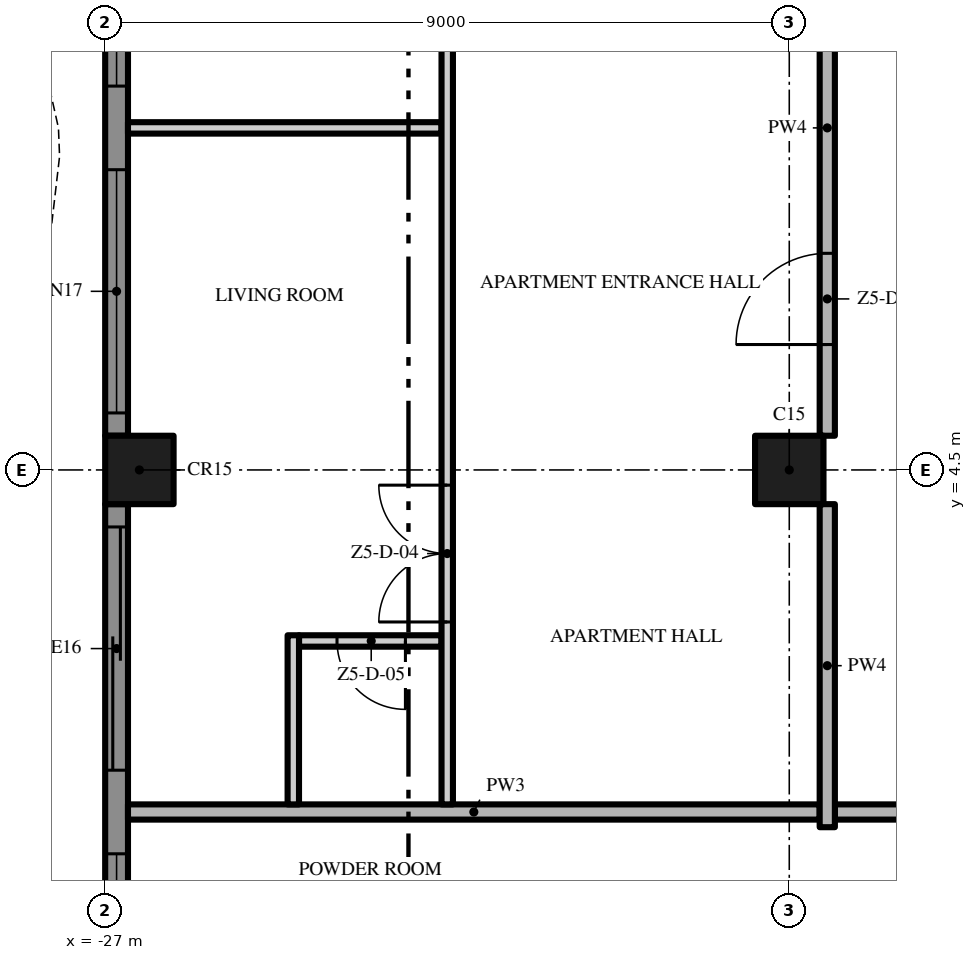
"""IFC4 building model, lengths in metres.
Left out: names, types, materials, properties, quantities, classifications, styles, units other than length and angle.
Written with IfcOpenShell. Run it as: python <this file> out.ifc"""

import sys

from ifc_helpers import new_model, si_unit, direction, frame, frame_2d, origin, origin_2d, place, context, subcontext, project, spatial, polyline, rectangle, outline, extrude, element, fill, save


model = new_model("IFC4")
c1 = context("Model", 3, precision=1e-05, world=origin(), true_north=direction((0.0, 1.0)))
c2 = subcontext(c1, "Body", "Model", "MODEL_VIEW")
j1 = project(units=[si_unit("LENGTHUNIT", "METRE"), si_unit("PLANEANGLEUNIT", "RADIAN")], contexts=[c1])
p1 = place(None, origin())
s1 = spatial("IfcSite", under=j1, at=p1, CompositionType="ELEMENT")
p2 = place(p1, origin())
s2 = spatial("IfcBuilding", under=s1, at=p2, CompositionType="ELEMENT")
p3 = place(p2, frame((0.0, 0.0, 276.8)))
s3 = spatial("IfcBuildingStorey", under=s2, at=p3, CompositionType="ELEMENT", Elevation=276.8)
for number, where, z_axis, x_axis in (
    (1, (-18.0, 4.5, 0.0), (0.0, 0.0, 1.0), (1.0, 0.0, 0.0)),
    (2, (-26.55, 4.5, 0.0), (0.0, 0.0, 1.0), (1.0, 0.0, 0.0)),
):
    element("IfcColumn", number, at=place(p3, frame(where, z_axis=z_axis, x_axis=x_axis)), inside=s3, PredefinedType="COLUMN", context=c2, shape_type="SweptSolid", body=[
        extrude(rectangle(XDim=0.9, YDim=0.9, at=origin_2d()), origin(), (0.0, 0.0, 1.0), 3.5),
    ])
p4 = place(p3, frame((-26.85, 4.95, 0.0), z_axis=(0.0, 0.0, 1.0), x_axis=(0.0, 1.0, 0.0)))
e3 = element("IfcWall", 3, at=p4, inside=s3, PredefinedType="SOLIDWALL", context=c2, shape_type="SweptSolid", body=[
    extrude(rectangle(XDim=8.1, YDim=0.3, at=frame_2d((4.05, 0.0))), origin(), (0.0, 0.0, 1.0), 3.5),
])
p5 = place(p4, frame((4.6, 0.0, 0.45)))
e4 = element("IfcOpeningElement", 4, at=p5, cuts=e3, PredefinedType="OPENING", context=c2, shape_type="SweptSolid", body=[
    extrude(rectangle(XDim=3.2, YDim=2.65, at=frame_2d((1.6, 1.325))), frame((0.0, 0.16, 0.0), z_axis=(0.0, -1.0, 0.0), x_axis=(1.0, 0.0, 0.0)), (0.0, 0.0, 1.0), 0.32),
])
p6 = place(p4, frame((0.3, 0.0, 0.45)))
e5 = element("IfcOpeningElement", 5, at=p6, cuts=e3, PredefinedType="OPENING", context=c2, shape_type="SweptSolid", body=[
    extrude(rectangle(XDim=3.2, YDim=2.65, at=frame_2d((1.6, 1.325))), frame((0.0, 0.16, 0.0), z_axis=(0.0, -1.0, 0.0), x_axis=(1.0, 0.0, 0.0)), (0.0, 0.0, 1.0), 0.32),
])
p7 = place(p3, frame((-26.85, -4.05, 0.0), z_axis=(0.0, 0.0, 1.0), x_axis=(0.0, 1.0, 0.0)))
e6 = element("IfcWall", 6, at=p7, inside=s3, PredefinedType="SOLIDWALL", context=c2, shape_type="SweptSolid", body=[
    extrude(rectangle(XDim=8.1, YDim=0.3, at=frame_2d((4.05, 0.0))), origin(), (0.0, 0.0, 1.0), 3.5),
])
p8 = place(p7, frame((4.6, 0.0, 0.0)))
e7 = element("IfcOpeningElement", 7, at=p8, cuts=e6, PredefinedType="OPENING", context=c2, shape_type="SweptSolid", body=[
    extrude(rectangle(XDim=3.2, YDim=2.4, at=frame_2d((1.6, 1.2))), frame((0.0, 0.16, 0.0), z_axis=(0.0, -1.0, 0.0), x_axis=(1.0, 0.0, 0.0)), (0.0, 0.0, 1.0), 0.32),
])
p9 = place(p7, frame((0.3, 0.0, 0.45)))
e8 = element("IfcOpeningElement", 8, at=p9, cuts=e6, PredefinedType="OPENING", context=c2, shape_type="SweptSolid", body=[
    extrude(rectangle(XDim=3.2, YDim=2.65, at=frame_2d((1.6, 1.325))), frame((0.0, 0.16, 0.0), z_axis=(0.0, -1.0, 0.0), x_axis=(1.0, 0.0, 0.0)), (0.0, 0.0, 1.0), 0.32),
])
p10 = place(p3, origin())
e9 = element("IfcWall", 9, at=p10, inside=s3, PredefinedType="USERDEFINED", context=c2, shape_type="SweptSolid", body=[
    extrude(outline(polyline([(-29.649, 18.0), (-29.985, 16.5), (-30.0, 16.125), (-29.869, 15.0), (-29.345, 13.5), (-28.612, 12.0), (-27.951, 10.5), (-27.615, 9.0), (-27.6, 8.625), (-27.731, 7.5), (-28.255, 6.0), (-28.988, 4.5), (-29.649, 3.0), (-29.985, 1.5), (-30.0, 1.125), (-29.869, 0.0), (-29.345, -1.5), (-28.612, -3.0), (-27.951, -4.5), (-27.615, -6.0), (-27.6, -6.375), (-27.731, -7.5), (-28.255, -9.0), (-28.988, -10.5), (-29.649, -12.0), (-29.985, -13.5), (-30.0, -13.875), (-29.869, -15.0), (-29.345, -16.5), (-28.612, -18.0), (-28.388, -17.89), (-29.114, -16.404), (-29.624, -14.944), (-29.749, -13.865), (-29.736, -13.533), (-29.41, -12.079), (-28.761, -10.605), (-28.024, -9.096), (-27.486, -7.556), (-27.349, -6.385), (-27.366, -5.967), (-27.713, -4.421), (-28.385, -2.895), (-29.114, -1.404), (-29.624, 0.056), (-29.749, 1.135), (-29.736, 1.467), (-29.41, 2.921), (-28.761, 4.395), (-28.024, 5.904), (-27.486, 7.444), (-27.349, 8.615), (-27.366, 9.033), (-27.713, 10.579), (-28.385, 12.105), (-29.114, 13.596), (-29.624, 15.056), (-29.749, 16.135), (-29.736, 16.467), (-29.405, 17.945), (-29.649, 18.0)])), origin(), (0.0, 0.0, 1.0), 0.9),
])
p11 = place(p3, frame((17.4, 0.0, 0.0), z_axis=(0.0, 0.0, 1.0), x_axis=(-1.0, 0.0, 0.0)))
e10 = element("IfcWall", 10, at=p11, inside=s3, PredefinedType="PARTITIONING", context=c2, shape_type="SweptSolid", body=[
    extrude(rectangle(XDim=34.8, YDim=0.2, at=frame_2d((17.4, 0.0))), origin(), (0.0, 0.0, 1.0), 3.5),
])
p12 = place(p11, frame((25.65, 0.0, 0.0)))
e11 = element("IfcOpeningElement", 11, at=p12, cuts=e10, PredefinedType="OPENING", context=c2, shape_type="SweptSolid", body=[
    extrude(rectangle(XDim=1.5, YDim=2.4, at=frame_2d((0.75, 1.2))), frame((0.0, 0.11, 0.0), z_axis=(0.0, -1.0, 0.0), x_axis=(1.0, 0.0, 0.0)), (0.0, 0.0, 1.0), 0.22),
])
p13 = place(p11, frame((7.65, 0.0, 0.0)))
e12 = element("IfcOpeningElement", 12, at=p13, cuts=e10, PredefinedType="OPENING", context=c2, shape_type="SweptSolid", body=[
    extrude(rectangle(XDim=1.5, YDim=2.4, at=frame_2d((0.75, 1.2))), frame((0.0, 0.11, 0.0), z_axis=(0.0, -1.0, 0.0), x_axis=(1.0, 0.0, 0.0)), (0.0, 0.0, 1.0), 0.22),
])
p14 = place(p3, frame((-26.7, 0.0, 0.0), z_axis=(0.0, 0.0, 1.0), x_axis=(1.0, 0.0, 0.0)))
e13 = element("IfcWall", 13, at=p14, inside=s3, PredefinedType="PARTITIONING", context=c2, shape_type="SweptSolid", body=[
    extrude(rectangle(XDim=9.1, YDim=0.2, at=frame_2d((4.55, 0.0))), origin(), (0.0, 0.0, 1.0), 3.5),
])
p15 = place(p3, frame((-22.575, 2.25, 0.0), z_axis=(0.0, 0.0, 1.0), x_axis=(-1.0, 0.0, 0.0)))
e14 = element("IfcWall", 14, at=p15, inside=s3, PredefinedType="PARTITIONING", context=c2, shape_type="SweptSolid", body=[
    extrude(rectangle(XDim=1.875, YDim=0.15, at=frame_2d((0.938, 0.0))), origin(), (0.0, 0.0, 1.0), 3.5),
])
p16 = place(p15, frame((0.475, 0.0, 0.0)))
e15 = element("IfcOpeningElement", 15, at=p16, cuts=e14, PredefinedType="OPENING", context=c2, shape_type="SweptSolid", body=[
    extrude(rectangle(XDim=0.9, YDim=2.1, at=frame_2d((0.45, 1.05))), frame((0.0, 0.085, 0.0), z_axis=(0.0, -1.0, 0.0), x_axis=(1.0, 0.0, 0.0)), (0.0, 0.0, 1.0), 0.17),
])
p17 = place(p3, frame((-26.7, 9.0, 0.0), z_axis=(0.0, 0.0, 1.0), x_axis=(1.0, 0.0, 0.0)))
e16 = element("IfcWall", 16, at=p17, inside=s3, PredefinedType="PARTITIONING", context=c2, shape_type="SweptSolid", body=[
    extrude(rectangle(XDim=4.125, YDim=0.15, at=frame_2d((2.062, 0.0))), origin(), (0.0, 0.0, 1.0), 3.5),
])
p18 = place(p3, frame((-24.525, 0.1, 0.0), z_axis=(0.0, 0.0, 1.0), x_axis=(0.0, 1.0, 0.0)))
e17 = element("IfcWall", 17, at=p18, inside=s3, PredefinedType="PARTITIONING", context=c2, shape_type="SweptSolid", body=[
    extrude(rectangle(XDim=2.225, YDim=0.15, at=frame_2d((1.113, 0.0))), origin(), (0.0, 0.0, 1.0), 3.5),
])
p19 = place(p3, frame((-22.5, 0.1, 0.0), z_axis=(0.0, 0.0, 1.0), x_axis=(0.0, 1.0, 0.0)))
e18 = element("IfcWall", 18, at=p19, inside=s3, PredefinedType="PARTITIONING", context=c2, shape_type="SweptSolid", body=[
    extrude(rectangle(XDim=17.45, YDim=0.15, at=frame_2d((8.725, 0.0))), origin(), (0.0, 0.0, 1.0), 3.5),
])
p20 = place(p19, frame((2.4, 0.0, 0.0)))
e19 = element("IfcOpeningElement", 19, at=p20, cuts=e18, PredefinedType="OPENING", context=c2, shape_type="SweptSolid", body=[
    extrude(rectangle(XDim=1.8, YDim=2.4, at=frame_2d((0.9, 1.2))), frame((0.0, 0.085, 0.0), z_axis=(0.0, -1.0, 0.0), x_axis=(1.0, 0.0, 0.0)), (0.0, 0.0, 1.0), 0.17),
])
p21 = place(p19, frame((10.65, 0.0, 0.0)))
e20 = element("IfcOpeningElement", 20, at=p21, cuts=e18, PredefinedType="OPENING", context=c2, shape_type="SweptSolid", body=[
    extrude(rectangle(XDim=1.0, YDim=2.4, at=frame_2d((0.5, 1.2))), frame((0.0, 0.085, 0.0), z_axis=(0.0, -1.0, 0.0), x_axis=(1.0, 0.0, 0.0)), (0.0, 0.0, 1.0), 0.17),
])
p22 = place(p3, frame((-17.5, -0.2, 0.0), z_axis=(0.0, 0.0, 1.0), x_axis=(0.0, 1.0, 0.0)))
e21 = element("IfcWall", 21, at=p22, inside=s3, PredefinedType="PARTITIONING", context=c2, shape_type="SweptSolid", body=[
    extrude(rectangle(XDim=4.25, YDim=0.2, at=frame_2d((2.125, 0.0))), origin(), (0.0, 0.0, 1.0), 3.5),
])
p23 = place(p3, frame((-17.5, 4.95, 0.0), z_axis=(0.0, 0.0, 1.0), x_axis=(0.0, 1.0, 0.0)))
e22 = element("IfcWall", 22, at=p23, inside=s3, PredefinedType="PARTITIONING", context=c2, shape_type="SweptSolid", body=[
    extrude(rectangle(XDim=8.1, YDim=0.2, at=frame_2d((4.05, 0.0))), origin(), (0.0, 0.0, 1.0), 3.5),
])
p24 = place(p23, frame((1.2, 0.0, 0.0)))
e23 = element("IfcOpeningElement", 23, at=p24, cuts=e22, PredefinedType="OPENING", context=c2, shape_type="SweptSolid", body=[
    extrude(rectangle(XDim=1.2, YDim=2.4, at=frame_2d((0.6, 1.2))), frame((0.0, 0.11, 0.0), z_axis=(0.0, -1.0, 0.0), x_axis=(1.0, 0.0, 0.0)), (0.0, 0.0, 1.0), 0.22),
])
p25 = place(p5, origin())
e24 = element("IfcWindow", 24, at=p25, inside=s3, PartitioningType="SINGLE_PANEL", PredefinedType="WINDOW", context=c2, shape_type="SweptSolid", body=[
    extrude(rectangle(XDim=3.2, YDim=2.65, at=frame_2d((1.6, 1.325))), frame((0.0, 0.03, 0.0), z_axis=(0.0, -1.0, 0.0), x_axis=(1.0, 0.0, 0.0)), (0.0, 0.0, 1.0), 0.06),
])
fill(e4, e24)
p26 = place(p6, origin())
e25 = element("IfcWindow", 25, at=p26, inside=s3, PartitioningType="SINGLE_PANEL", PredefinedType="WINDOW", context=c2, shape_type="SweptSolid", body=[
    extrude(rectangle(XDim=3.2, YDim=2.65, at=frame_2d((1.6, 1.325))), frame((0.0, 0.03, 0.0), z_axis=(0.0, -1.0, 0.0), x_axis=(1.0, 0.0, 0.0)), (0.0, 0.0, 1.0), 0.06),
])
fill(e5, e25)
p27 = place(p8, origin())
e26 = element("IfcDoor", 26, at=p27, inside=s3, OperationType="SINGLE_SWING_LEFT", PredefinedType="DOOR", context=c2, shape_type="SweptSolid", body=[
    extrude(rectangle(XDim=3.2, YDim=2.4, at=frame_2d((1.6, 1.2))), frame((0.0, 0.025, 0.0), z_axis=(0.0, -1.0, 0.0), x_axis=(1.0, 0.0, 0.0)), (0.0, 0.0, 1.0), 0.05),
])
fill(e7, e26)
p28 = place(p9, origin())
e27 = element("IfcWindow", 27, at=p28, inside=s3, PartitioningType="SINGLE_PANEL", PredefinedType="WINDOW", context=c2, shape_type="SweptSolid", body=[
    extrude(rectangle(XDim=3.2, YDim=2.65, at=frame_2d((1.6, 1.325))), frame((0.0, 0.03, 0.0), z_axis=(0.0, -1.0, 0.0), x_axis=(1.0, 0.0, 0.0)), (0.0, 0.0, 1.0), 0.06),
])
fill(e8, e27)
p29 = place(p24, origin())
e28 = element("IfcDoor", 28, at=p29, inside=s3, OperationType="SINGLE_SWING_LEFT", PredefinedType="DOOR", context=c2, shape_type="SweptSolid", body=[
    extrude(rectangle(XDim=1.2, YDim=2.4, at=frame_2d((0.6, 1.2))), frame((0.0, 0.025, 0.0), z_axis=(0.0, -1.0, 0.0), x_axis=(1.0, 0.0, 0.0)), (0.0, 0.0, 1.0), 0.05),
])
fill(e23, e28)
p30 = place(p20, origin())
e29 = element("IfcDoor", 29, at=p30, inside=s3, OperationType="DOUBLE_DOOR_SINGLE_SWING", PredefinedType="DOOR", context=c2, shape_type="SweptSolid", body=[
    extrude(rectangle(XDim=1.8, YDim=2.4, at=frame_2d((0.9, 1.2))), frame((0.0, 0.025, 0.0), z_axis=(0.0, -1.0, 0.0), x_axis=(1.0, 0.0, 0.0)), (0.0, 0.0, 1.0), 0.05),
])
fill(e19, e29)
p31 = place(p16, origin())
e30 = element("IfcDoor", 30, at=p31, inside=s3, OperationType="SINGLE_SWING_LEFT", PredefinedType="DOOR", context=c2, shape_type="SweptSolid", body=[
    extrude(rectangle(XDim=0.9, YDim=2.1, at=frame_2d((0.45, 1.05))), frame((0.0, 0.025, 0.0), z_axis=(0.0, -1.0, 0.0), x_axis=(1.0, 0.0, 0.0)), (0.0, 0.0, 1.0), 0.05),
])
fill(e15, e30)
save(model, sys.argv[1])
